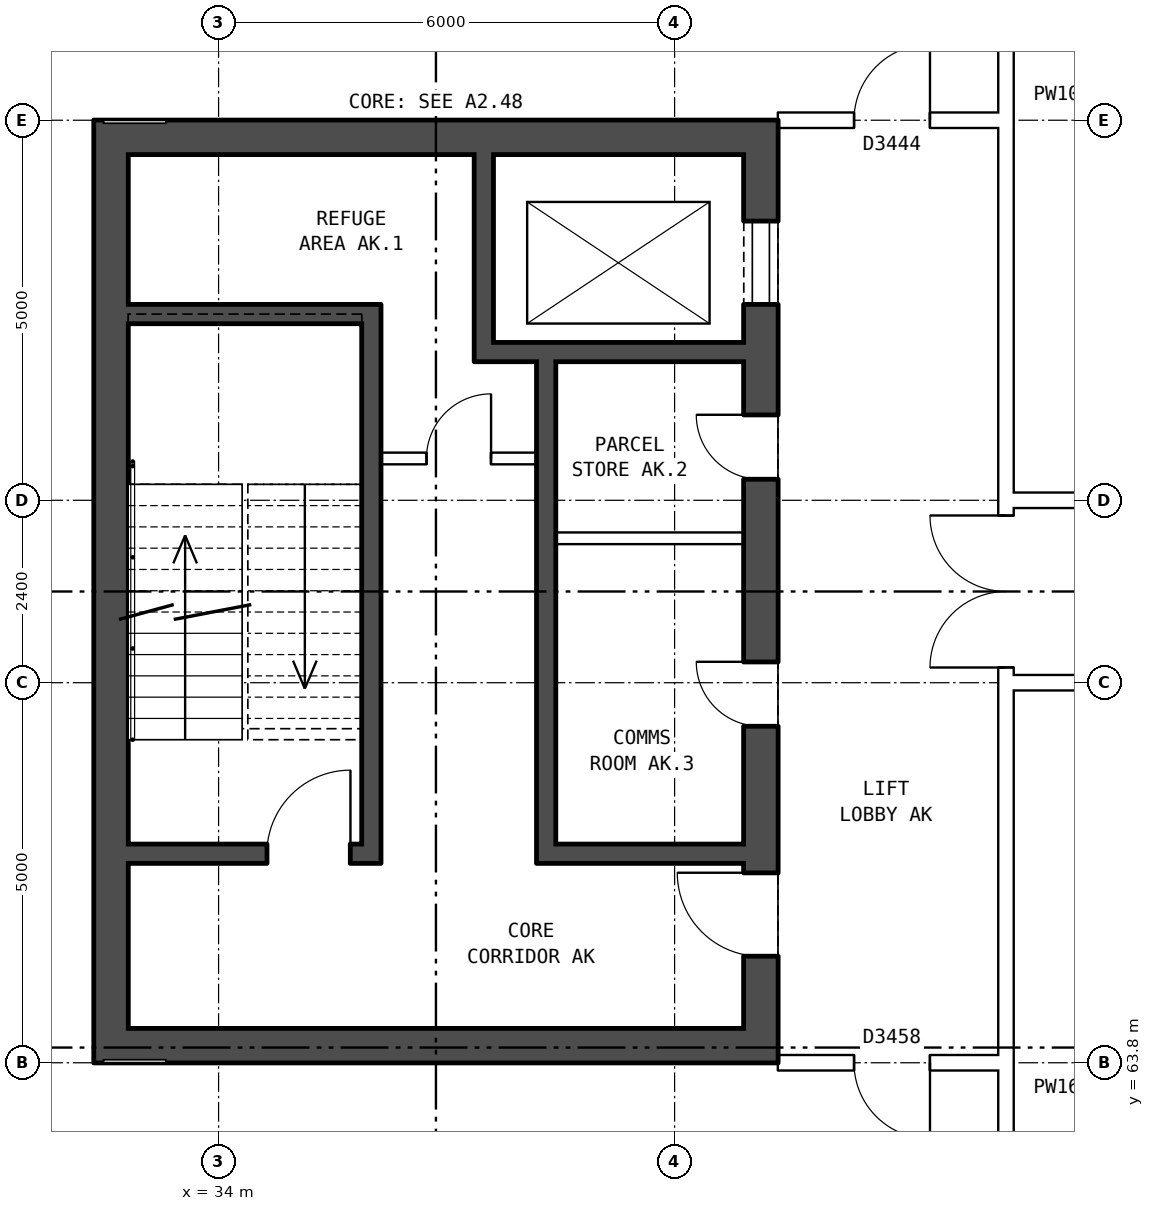
"""IFC4 building model, lengths in metres.
Left out: names, types, materials, properties, quantities, classifications, styles, units other than length and angle.
Written with IfcOpenShell. Run it as: python <this file> out.ifc"""

import sys

from ifc_helpers import new_model, si_unit, direction, frame, frame_2d, origin, place, context, subcontext, project, spatial, rectangle, extrude, element, fill, save


model = new_model("IFC4")
c1 = context("Model", 3, precision=1e-05, world=origin(), true_north=direction((0.0, 1.0)))
c2 = subcontext(c1, "Body", "Model", "MODEL_VIEW")
j1 = project(units=[si_unit("LENGTHUNIT", "METRE"), si_unit("PLANEANGLEUNIT", "RADIAN")], contexts=[c1])
p1 = place(None, origin())
s1 = spatial("IfcSite", under=j1, at=p1, CompositionType="ELEMENT")
p2 = place(p1, origin())
s2 = spatial("IfcBuilding", under=s1, at=p2, CompositionType="ELEMENT")
p3 = place(p2, frame((0.0, 0.0, 167.1)))
s3 = spatial("IfcBuildingStorey", under=s2, at=p3, CompositionType="ELEMENT", Elevation=167.1)
p4 = place(p3, frame((41.135, 76.2, 0.0), z_axis=(0.0, 0.0, 1.0), x_axis=(0.0, -1.0, 0.0)))
e1 = element("IfcWall", 1, at=p4, inside=s3, PredefinedType="SHEAR", context=c2, shape_type="SweptSolid", body=[
    extrude(rectangle(XDim=12.4, YDim=0.45, at=frame_2d((6.2, 0.0))), origin(), (0.0, 0.0, 1.0), 4.2),
])
p5 = place(p4, frame((1.325, 0.0, 0.0)))
e2 = element("IfcOpeningElement", 2, at=p5, cuts=e1, PredefinedType="OPENING", context=c2, shape_type="SweptSolid", body=[
    extrude(rectangle(XDim=1.1, YDim=2.1, at=frame_2d((0.55, 1.05))), frame((0.0, 0.235, 0.0), z_axis=(0.0, -1.0, 0.0), x_axis=(1.0, 0.0, 0.0)), (0.0, 0.0, 1.0), 0.47),
])
p6 = place(p4, frame((3.875, 0.0, 0.0)))
e3 = element("IfcOpeningElement", 3, at=p6, cuts=e1, PredefinedType="OPENING", context=c2, shape_type="SweptSolid", body=[
    extrude(rectangle(XDim=0.85, YDim=2.1, at=frame_2d((0.425, 1.05))), frame((0.0, 0.235, 0.0), z_axis=(0.0, -1.0, 0.0), x_axis=(1.0, 0.0, 0.0)), (0.0, 0.0, 1.0), 0.47),
])
p7 = place(p4, frame((7.125, 0.0, 0.0)))
e4 = element("IfcOpeningElement", 4, at=p7, cuts=e1, PredefinedType="OPENING", context=c2, shape_type="SweptSolid", body=[
    extrude(rectangle(XDim=0.85, YDim=2.1, at=frame_2d((0.425, 1.05))), frame((0.0, 0.235, 0.0), z_axis=(0.0, -1.0, 0.0), x_axis=(1.0, 0.0, 0.0)), (0.0, 0.0, 1.0), 0.47),
])
p8 = place(p4, frame((9.9, 0.0, 0.0)))
e5 = element("IfcOpeningElement", 5, at=p8, cuts=e1, PredefinedType="OPENING", context=c2, shape_type="SweptSolid", body=[
    extrude(rectangle(XDim=1.1, YDim=2.1, at=frame_2d((0.55, 1.05))), frame((0.0, 0.235, 0.0), z_axis=(0.0, -1.0, 0.0), x_axis=(1.0, 0.0, 0.0)), (0.0, 0.0, 1.0), 0.47),
])
p9 = place(p3, frame((32.585, 76.2, 0.0), z_axis=(0.0, 0.0, 1.0), x_axis=(0.0, -1.0, 0.0)))
e6 = element("IfcWall", 6, at=p9, inside=s3, PredefinedType="SHEAR", context=c2, shape_type="SweptSolid", body=[
    extrude(rectangle(XDim=12.4, YDim=0.45, at=frame_2d((6.2, 0.0))), origin(), (0.0, 0.0, 1.0), 4.2),
])
for number, where, z_axis, x_axis in (
    (7, (40.91, 75.975, 0.0), (0.0, 0.0, 1.0), (-1.0, 0.0, 0.0)),
    (8, (40.91, 64.025, 0.0), (0.0, 0.0, 1.0), (-1.0, 0.0, 0.0)),
):
    element("IfcWall", number, at=place(p3, frame(where, z_axis=z_axis, x_axis=x_axis)), inside=s3, PredefinedType="SHEAR", context=c2, shape_type="SweptSolid", body=[
        extrude(rectangle(XDim=8.1, YDim=0.45, at=frame_2d((4.05, 0.0))), origin(), (0.0, 0.0, 1.0), 4.2),
    ])
p10 = place(p3, frame((35.885, 73.65, 0.0), z_axis=(0.0, 0.0, 1.0), x_axis=(-1.0, 0.0, 0.0)))
e9 = element("IfcWall", 9, at=p10, inside=s3, PredefinedType="SHEAR", context=c2, shape_type="SweptSolid", body=[
    extrude(rectangle(XDim=3.075, YDim=0.25, at=frame_2d((1.538, 0.0))), origin(), (0.0, 0.0, 1.0), 4.2),
])
p11 = place(p3, frame((40.91, 73.15, 0.0), z_axis=(0.0, 0.0, 1.0), x_axis=(-1.0, 0.0, 0.0)))
e10 = element("IfcWall", 10, at=p11, inside=s3, PredefinedType="SHEAR", context=c2, shape_type="SweptSolid", body=[
    extrude(rectangle(XDim=3.545, YDim=0.25, at=frame_2d((1.772, 0.0))), origin(), (0.0, 0.0, 1.0), 4.2),
])
p12 = place(p3, frame((38.185, 71.75, 0.0), z_axis=(0.0, 0.0, 1.0), x_axis=(-1.0, 0.0, 0.0)))
e11 = element("IfcWall", 11, at=p12, inside=s3, PredefinedType="PARTITIONING", context=c2, shape_type="SweptSolid", body=[
    extrude(rectangle(XDim=2.05, YDim=0.15, at=frame_2d((1.025, 0.0))), origin(), (0.0, 0.0, 1.0), 4.2),
])
p13 = place(p12, frame((0.6, 0.0, 0.0)))
e12 = element("IfcOpeningElement", 12, at=p13, cuts=e11, PredefinedType="OPENING", context=c2, shape_type="SweptSolid", body=[
    extrude(rectangle(XDim=0.85, YDim=2.1, at=frame_2d((0.425, 1.05))), frame((0.0, 0.085, 0.0), z_axis=(0.0, -1.0, 0.0), x_axis=(1.0, 0.0, 0.0)), (0.0, 0.0, 1.0), 0.17),
])
p14 = place(p3, frame((40.91, 70.7, 0.0), z_axis=(0.0, 0.0, 1.0), x_axis=(-1.0, 0.0, 0.0)))
e13 = element("IfcWall", 13, at=p14, inside=s3, PredefinedType="PARTITIONING", context=c2, shape_type="SweptSolid", body=[
    extrude(rectangle(XDim=2.475, YDim=0.15, at=frame_2d((1.237, 0.0))), origin(), (0.0, 0.0, 1.0), 4.2),
])
p15 = place(p3, frame((40.91, 66.55, 0.0), z_axis=(0.0, 0.0, 1.0), x_axis=(-1.0, 0.0, 0.0)))
e14 = element("IfcWall", 14, at=p15, inside=s3, PredefinedType="SHEAR", context=c2, shape_type="SweptSolid", body=[
    extrude(rectangle(XDim=2.475, YDim=0.25, at=frame_2d((1.237, 0.0))), origin(), (0.0, 0.0, 1.0), 4.2),
])
p16 = place(p3, frame((35.885, 66.55, 0.0), z_axis=(0.0, 0.0, 1.0), x_axis=(-1.0, 0.0, 0.0)))
e15 = element("IfcWall", 15, at=p16, inside=s3, PredefinedType="SHEAR", context=c2, shape_type="SweptSolid", body=[
    extrude(rectangle(XDim=3.075, YDim=0.25, at=frame_2d((1.538, 0.0))), origin(), (0.0, 0.0, 1.0), 4.2),
])
p17 = place(p16, frame((0.15, 0.0, 0.0)))
e16 = element("IfcOpeningElement", 16, at=p17, cuts=e15, PredefinedType="OPENING", context=c2, shape_type="SweptSolid", body=[
    extrude(rectangle(XDim=1.1, YDim=2.1, at=frame_2d((0.55, 1.05))), frame((0.0, 0.135, 0.0), z_axis=(0.0, -1.0, 0.0), x_axis=(1.0, 0.0, 0.0)), (0.0, 0.0, 1.0), 0.27),
])
p18 = place(p3, frame((38.31, 73.025, 0.0), z_axis=(0.0, 0.0, 1.0), x_axis=(0.0, -1.0, 0.0)))
e17 = element("IfcWall", 17, at=p18, inside=s3, PredefinedType="SHEAR", context=c2, shape_type="SweptSolid", body=[
    extrude(rectangle(XDim=6.6, YDim=0.25, at=frame_2d((3.3, 0.0))), origin(), (0.0, 0.0, 1.0), 4.2),
])
p19 = place(p3, frame((37.49, 75.75, 0.0), z_axis=(0.0, 0.0, 1.0), x_axis=(0.0, -1.0, 0.0)))
e18 = element("IfcWall", 18, at=p19, inside=s3, PredefinedType="SHEAR", context=c2, shape_type="SweptSolid", body=[
    extrude(rectangle(XDim=2.475, YDim=0.25, at=frame_2d((1.238, 0.0))), origin(), (0.0, 0.0, 1.0), 4.2),
])
p20 = place(p3, frame((36.01, 73.775, 0.0), z_axis=(0.0, 0.0, 1.0), x_axis=(0.0, -1.0, 0.0)))
e19 = element("IfcWall", 19, at=p20, inside=s3, PredefinedType="SHEAR", context=c2, shape_type="SweptSolid", body=[
    extrude(rectangle(XDim=7.35, YDim=0.25, at=frame_2d((3.675, 0.0))), origin(), (0.0, 0.0, 1.0), 4.2),
])
p21 = place(p3, frame((44.36, 63.9, 0.0), z_axis=(0.0, 0.0, 1.0), x_axis=(0.0, 1.0, 0.0)))
e20 = element("IfcWall", 20, at=p21, inside=s3, PredefinedType="PARTITIONING", context=c2, shape_type="SweptSolid", body=[
    extrude(rectangle(XDim=12.2, YDim=0.2, at=frame_2d((6.1, 0.0))), origin(), (0.0, 0.0, 1.0), 4.2),
])
p22 = place(p21, frame((5.1, 0.0, 0.0)))
e21 = element("IfcOpeningElement", 21, at=p22, cuts=e20, PredefinedType="OPENING", context=c2, shape_type="SweptSolid", body=[
    extrude(rectangle(XDim=2.0, YDim=2.1, at=frame_2d((1.0, 1.05))), frame((0.0, 0.11, 0.0), z_axis=(0.0, -1.0, 0.0), x_axis=(1.0, 0.0, 0.0)), (0.0, 0.0, 1.0), 0.22),
])
p23 = place(p3, frame((41.36, 63.8, 0.0), z_axis=(0.0, 0.0, 1.0), x_axis=(1.0, 0.0, 0.0)))
e22 = element("IfcWall", 22, at=p23, inside=s3, PredefinedType="PARTITIONING", context=c2, shape_type="SweptSolid", body=[
    extrude(rectangle(XDim=3.1, YDim=0.2, at=frame_2d((1.55, 0.0))), origin(), (0.0, 0.0, 1.0), 4.2),
])
p24 = place(p23, frame((1.0, 0.0, 0.0)))
e23 = element("IfcOpeningElement", 23, at=p24, cuts=e22, PredefinedType="OPENING", context=c2, shape_type="SweptSolid", body=[
    extrude(rectangle(XDim=1.0, YDim=2.1, at=frame_2d((0.5, 1.05))), frame((0.0, 0.11, 0.0), z_axis=(0.0, -1.0, 0.0), x_axis=(1.0, 0.0, 0.0)), (0.0, 0.0, 1.0), 0.22),
])
p25 = place(p3, frame((44.36, 68.8, 0.0), z_axis=(0.0, 0.0, 1.0), x_axis=(1.0, 0.0, 0.0)))
e24 = element("IfcWall", 24, at=p25, inside=s3, PredefinedType="PARTITIONING", context=c2, shape_type="SweptSolid", body=[
    extrude(rectangle(XDim=19.28, YDim=0.2, at=frame_2d((9.64, 0.0))), origin(), (0.0, 0.0, 1.0), 4.2),
])
p26 = place(p3, frame((44.36, 71.2, 0.0), z_axis=(0.0, 0.0, 1.0), x_axis=(1.0, 0.0, 0.0)))
e25 = element("IfcWall", 25, at=p26, inside=s3, PredefinedType="PARTITIONING", context=c2, shape_type="SweptSolid", body=[
    extrude(rectangle(XDim=19.28, YDim=0.2, at=frame_2d((9.64, 0.0))), origin(), (0.0, 0.0, 1.0), 4.2),
])
p27 = place(p26, frame((10.14, 0.0, 0.0)))
e26 = element("IfcOpeningElement", 26, at=p27, cuts=e25, PredefinedType="OPENING", context=c2, shape_type="SweptSolid", body=[
    extrude(rectangle(XDim=1.0, YDim=2.1, at=frame_2d((0.5, 1.05))), frame((0.0, 0.11, 0.0), z_axis=(0.0, -1.0, 0.0), x_axis=(1.0, 0.0, 0.0)), (0.0, 0.0, 1.0), 0.22),
])
p28 = place(p3, frame((41.36, 76.2, 0.0), z_axis=(0.0, 0.0, 1.0), x_axis=(1.0, 0.0, 0.0)))
e27 = element("IfcWall", 27, at=p28, inside=s3, PredefinedType="PARTITIONING", context=c2, shape_type="SweptSolid", body=[
    extrude(rectangle(XDim=3.1, YDim=0.2, at=frame_2d((1.55, 0.0))), origin(), (0.0, 0.0, 1.0), 4.2),
])
p29 = place(p28, frame((1.0, 0.0, 0.0)))
e28 = element("IfcOpeningElement", 28, at=p29, cuts=e27, PredefinedType="OPENING", context=c2, shape_type="SweptSolid", body=[
    extrude(rectangle(XDim=1.0, YDim=2.1, at=frame_2d((0.5, 1.05))), frame((0.0, 0.11, 0.0), z_axis=(0.0, -1.0, 0.0), x_axis=(1.0, 0.0, 0.0)), (0.0, 0.0, 1.0), 0.22),
])
p30 = place(p3, frame((44.36, 60.7, 0.0), z_axis=(0.0, 0.0, 1.0), x_axis=(0.0, 1.0, 0.0)))
e29 = element("IfcWall", 29, at=p30, inside=s3, PredefinedType="PARTITIONING", context=c2, shape_type="SweptSolid", body=[
    extrude(rectangle(XDim=3.2, YDim=0.2, at=frame_2d((1.6, 0.0))), origin(), (0.0, 0.0, 1.0), 4.2),
])
p31 = place(p30, frame((1.1, 0.0, 0.0)))
e30 = element("IfcOpeningElement", 30, at=p31, cuts=e29, PredefinedType="OPENING", context=c2, shape_type="SweptSolid", body=[
    extrude(rectangle(XDim=1.0, YDim=2.1, at=frame_2d((0.5, 1.05))), frame((0.0, 0.11, 0.0), z_axis=(0.0, -1.0, 0.0), x_axis=(1.0, 0.0, 0.0)), (0.0, 0.0, 1.0), 0.22),
])
p32 = place(p3, frame((44.36, 76.1, 0.0), z_axis=(0.0, 0.0, 1.0), x_axis=(0.0, 1.0, 0.0)))
e31 = element("IfcWall", 31, at=p32, inside=s3, PredefinedType="PARTITIONING", context=c2, shape_type="SweptSolid", body=[
    extrude(rectangle(XDim=3.2, YDim=0.2, at=frame_2d((1.6, 0.0))), origin(), (0.0, 0.0, 1.0), 4.2),
])
p33 = place(p32, frame((1.1, 0.0, 0.0)))
e32 = element("IfcOpeningElement", 32, at=p33, cuts=e31, PredefinedType="OPENING", context=c2, shape_type="SweptSolid", body=[
    extrude(rectangle(XDim=1.0, YDim=2.1, at=frame_2d((0.5, 1.05))), frame((0.0, 0.11, 0.0), z_axis=(0.0, -1.0, 0.0), x_axis=(1.0, 0.0, 0.0)), (0.0, 0.0, 1.0), 0.22),
])
p34 = place(p5, origin())
e33 = element("IfcDoor", 33, at=p34, inside=s3, OperationType="DOUBLE_DOOR_SLIDING", PredefinedType="DOOR", context=c2, shape_type="SweptSolid", body=[
    extrude(rectangle(XDim=1.1, YDim=2.1, at=frame_2d((0.55, 1.05))), frame((0.0, -0.16, 0.0), z_axis=(0.0, -1.0, 0.0), x_axis=(1.0, 0.0, 0.0)), (0.0, 0.0, 1.0), 0.05),
])
fill(e2, e33)
p35 = place(p6, frame((0.85, 0.0, 0.0), z_axis=(0.0, 0.0, 1.0), x_axis=(-1.0, 0.0, 0.0)))
e34 = element("IfcDoor", 34, at=p35, inside=s3, OperationType="SINGLE_SWING_RIGHT", PredefinedType="DOOR", context=c2, shape_type="SweptSolid", body=[
    extrude(rectangle(XDim=0.85, YDim=2.1, at=frame_2d((0.425, 1.05))), frame((0.0, 0.21, 0.0), z_axis=(0.0, -1.0, 0.0), x_axis=(1.0, 0.0, 0.0)), (0.0, 0.0, 1.0), 0.05),
])
fill(e3, e34)
p36 = place(p7, frame((0.85, 0.0, 0.0), z_axis=(0.0, 0.0, 1.0), x_axis=(-1.0, 0.0, 0.0)))
e35 = element("IfcDoor", 35, at=p36, inside=s3, OperationType="SINGLE_SWING_RIGHT", PredefinedType="DOOR", context=c2, shape_type="SweptSolid", body=[
    extrude(rectangle(XDim=0.85, YDim=2.1, at=frame_2d((0.425, 1.05))), frame((0.0, 0.21, 0.0), z_axis=(0.0, -1.0, 0.0), x_axis=(1.0, 0.0, 0.0)), (0.0, 0.0, 1.0), 0.05),
])
fill(e4, e35)
p37 = place(p8, frame((1.1, 0.0, 0.0), z_axis=(0.0, 0.0, 1.0), x_axis=(-1.0, 0.0, 0.0)))
e36 = element("IfcDoor", 36, at=p37, inside=s3, OperationType="SINGLE_SWING_RIGHT", PredefinedType="DOOR", context=c2, shape_type="SweptSolid", body=[
    extrude(rectangle(XDim=1.1, YDim=2.1, at=frame_2d((0.55, 1.05))), frame((0.0, 0.21, 0.0), z_axis=(0.0, -1.0, 0.0), x_axis=(1.0, 0.0, 0.0)), (0.0, 0.0, 1.0), 0.05),
])
fill(e5, e36)
p38 = place(p17, frame((1.1, 0.0, 0.0), z_axis=(0.0, 0.0, 1.0), x_axis=(-1.0, 0.0, 0.0)))
e37 = element("IfcDoor", 37, at=p38, inside=s3, OperationType="SINGLE_SWING_RIGHT", PredefinedType="DOOR", context=c2, shape_type="SweptSolid", body=[
    extrude(rectangle(XDim=1.1, YDim=2.1, at=frame_2d((0.55, 1.05))), frame((0.0, 0.025, 0.0), z_axis=(0.0, -1.0, 0.0), x_axis=(1.0, 0.0, 0.0)), (0.0, 0.0, 1.0), 0.05),
])
fill(e16, e37)
p39 = place(p13, frame((0.85, 0.0, 0.0), z_axis=(0.0, 0.0, 1.0), x_axis=(-1.0, 0.0, 0.0)))
e38 = element("IfcDoor", 38, at=p39, inside=s3, OperationType="SINGLE_SWING_RIGHT", PredefinedType="DOOR", context=c2, shape_type="SweptSolid", body=[
    extrude(rectangle(XDim=0.85, YDim=2.1, at=frame_2d((0.425, 1.05))), frame((0.0, 0.025, 0.0), z_axis=(0.0, -1.0, 0.0), x_axis=(1.0, 0.0, 0.0)), (0.0, 0.0, 1.0), 0.05),
])
fill(e12, e38)
p40 = place(p22, origin())
e39 = element("IfcDoor", 39, at=p40, inside=s3, OperationType="DOUBLE_DOOR_SINGLE_SWING", PredefinedType="DOOR", context=c2, shape_type="SweptSolid", body=[
    extrude(rectangle(XDim=2.0, YDim=2.1, at=frame_2d((1.0, 1.05))), frame((0.0, 0.025, 0.0), z_axis=(0.0, -1.0, 0.0), x_axis=(1.0, 0.0, 0.0)), (0.0, 0.0, 1.0), 0.05),
])
fill(e21, e39)
p41 = place(p24, frame((1.0, 0.0, 0.0), z_axis=(0.0, 0.0, 1.0), x_axis=(-1.0, 0.0, 0.0)))
e40 = element("IfcDoor", 40, at=p41, inside=s3, OperationType="SINGLE_SWING_LEFT", PredefinedType="DOOR", context=c2, shape_type="SweptSolid", body=[
    extrude(rectangle(XDim=1.0, YDim=2.1, at=frame_2d((0.5, 1.05))), frame((0.0, 0.025, 0.0), z_axis=(0.0, -1.0, 0.0), x_axis=(1.0, 0.0, 0.0)), (0.0, 0.0, 1.0), 0.05),
])
fill(e23, e40)
p42 = place(p29, origin())
e41 = element("IfcDoor", 41, at=p42, inside=s3, OperationType="SINGLE_SWING_RIGHT", PredefinedType="DOOR", context=c2, shape_type="SweptSolid", body=[
    extrude(rectangle(XDim=1.0, YDim=2.1, at=frame_2d((0.5, 1.05))), frame((0.0, 0.025, 0.0), z_axis=(0.0, -1.0, 0.0), x_axis=(1.0, 0.0, 0.0)), (0.0, 0.0, 1.0), 0.05),
])
fill(e28, e41)
save(model, sys.argv[1])
